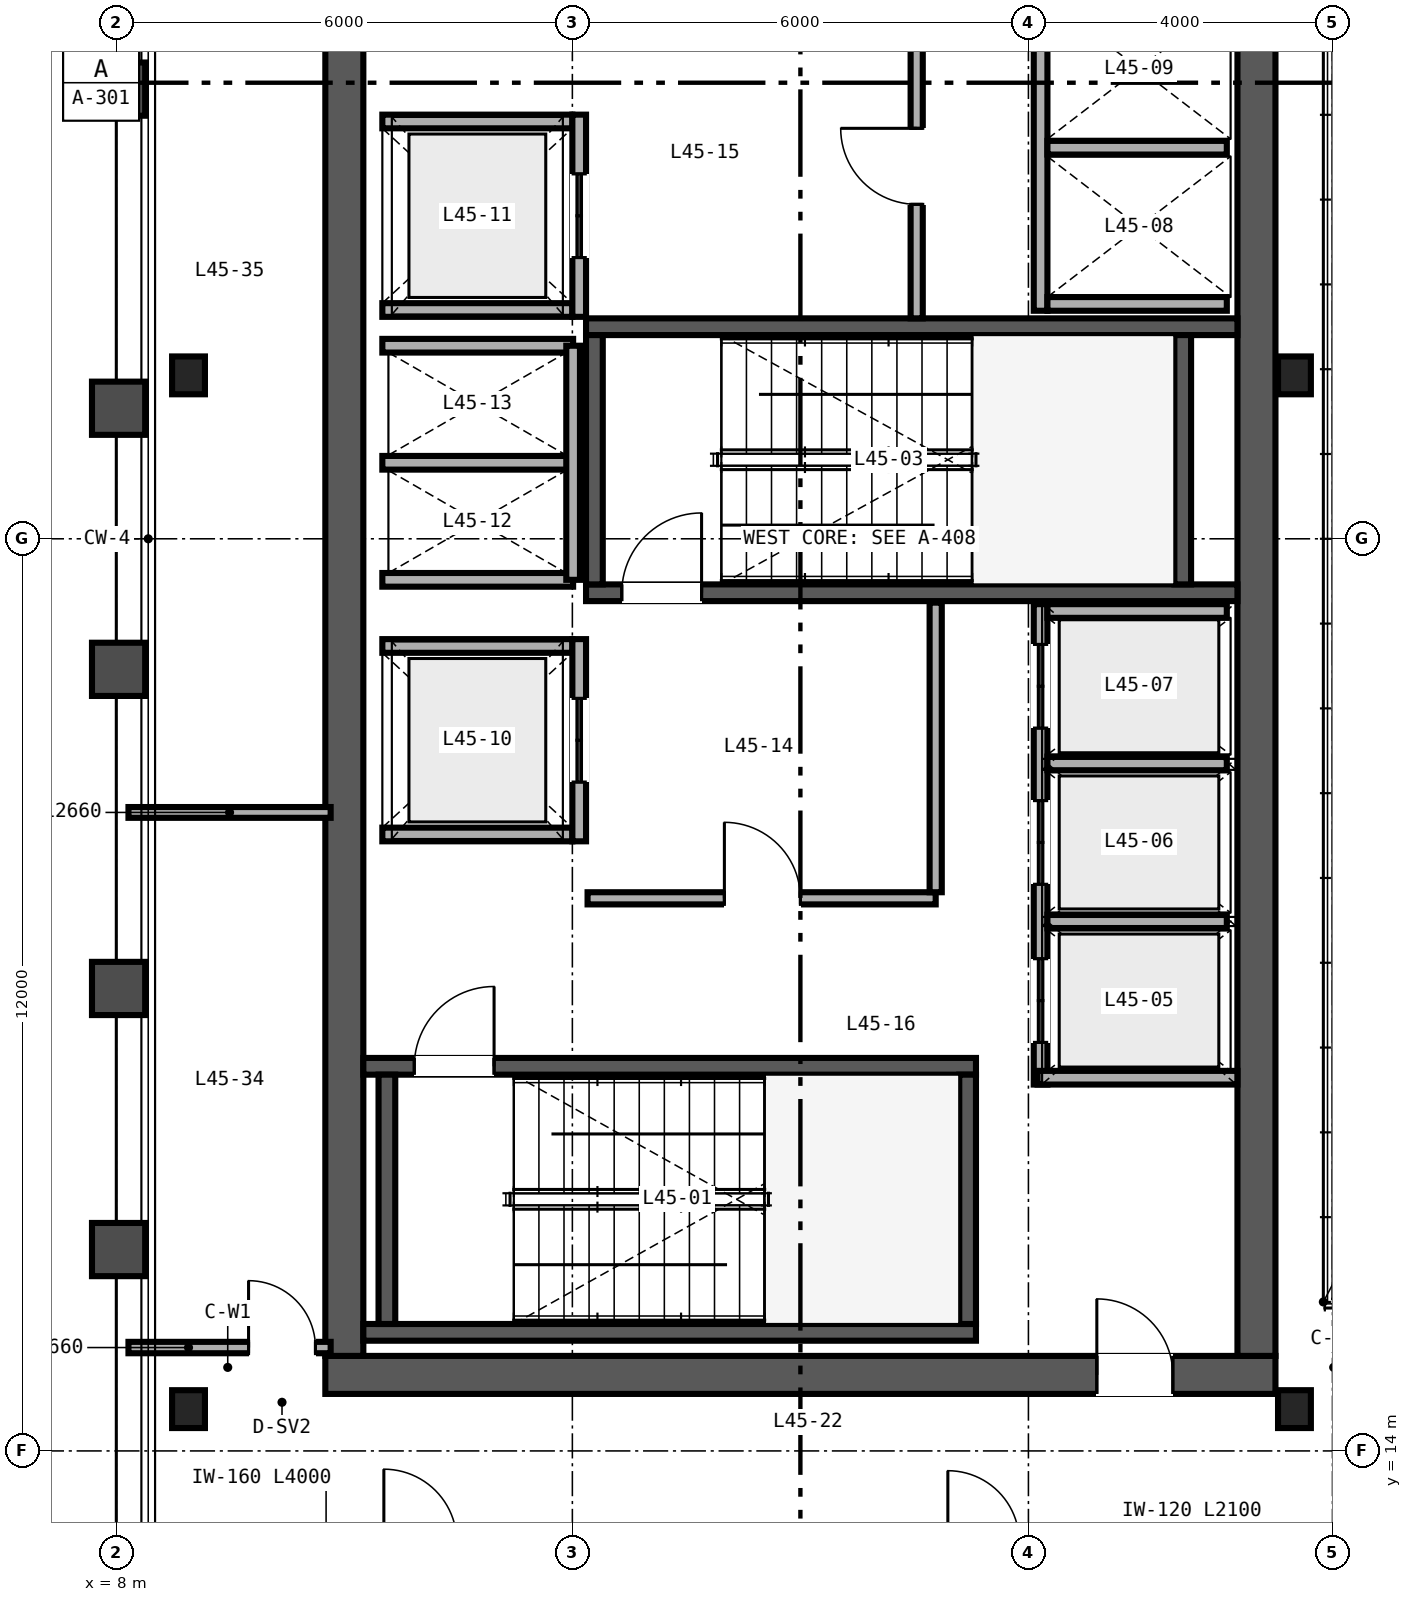
"""IFC4 building model, lengths in metres.
Left out: names, types, materials, properties, quantities, classifications, styles, units other than length and angle.
Written with IfcOpenShell. Run it as: python <this file> out.ifc"""

import sys

from ifc_helpers import new_model, si_unit, direction, frame, frame_2d, origin, origin_2d, place, context, subcontext, project, spatial, rectangle, i_section, extrude, source, transform, mapped, element, fill, save


model = new_model("IFC4")
c1 = context("Model", 3, precision=1e-05, world=origin(), true_north=direction((0.0, 1.0)))
c2 = subcontext(c1, "Body", "Model", "MODEL_VIEW")
j1 = project(units=[si_unit("LENGTHUNIT", "METRE"), si_unit("PLANEANGLEUNIT", "RADIAN")], contexts=[c1])
p1 = place(None, origin())
s1 = spatial("IfcSite", under=j1, at=p1, CompositionType="ELEMENT")
p2 = place(p1, origin())
s2 = spatial("IfcBuilding", under=s1, at=p2, CompositionType="ELEMENT")
p3 = place(p2, frame((0.0, 0.0, 181.2)))
s3 = spatial("IfcBuildingStorey", under=s2, at=p3, CompositionType="ELEMENT", Elevation=181.2)
p4 = place(p3, frame((10.75, 15.0, 0.0), z_axis=(0.0, 0.0, 1.0), x_axis=(1.0, 0.0, 0.0)))
e1 = element("IfcWall", 1, at=p4, inside=s3, PredefinedType="SHEAR", context=c2, shape_type="SweptSolid", body=[
    extrude(rectangle(XDim=12.5, YDim=0.5, at=frame_2d((6.25, 0.0))), origin(), (0.0, 0.0, 1.0), 3.37),
])
p5 = place(p4, frame((10.15, 0.0, 0.0)))
e2 = element("IfcOpeningElement", 2, at=p5, cuts=e1, PredefinedType="OPENING", context=c2, shape_type="SweptSolid", body=[
    extrude(rectangle(XDim=1.0, YDim=2.15, at=frame_2d((0.5, 1.075))), frame((0.0, 0.26, 0.0), z_axis=(0.0, -1.0, 0.0), x_axis=(1.0, 0.0, 0.0)), (0.0, 0.0, 1.0), 0.52),
])
for number, where, z_axis, x_axis in (
    (3, (11.0, 15.25, 0.0), (0.0, 0.0, 1.0), (0.0, 1.0, 0.0)),
    (4, (23.0, 15.25, 0.0), (0.0, 0.0, 1.0), (0.0, 1.0, 0.0)),
):
    element("IfcWall", number, at=place(p3, frame(where, z_axis=z_axis, x_axis=x_axis)), inside=s3, PredefinedType="SHEAR", context=c2, shape_type="SweptSolid", body=[
        extrude(rectangle(XDim=21.5, YDim=0.5, at=frame_2d((10.75, 0.0))), origin(), (0.0, 0.0, 1.0), 3.37),
    ])
p6 = place(p3, frame((11.25, 15.56, 0.0), z_axis=(0.0, 0.0, 1.0), x_axis=(1.0, 0.0, 0.0)))
e5 = element("IfcWall", 5, at=p6, inside=s3, PredefinedType="SHEAR", context=c2, shape_type="SweptSolid", body=[
    extrude(rectangle(XDim=8.06, YDim=0.22, at=frame_2d((4.03, 0.0))), origin(), (0.0, 0.0, 1.0), 3.4),
])
p7 = place(p3, frame((11.25, 19.06, 0.0), z_axis=(0.0, 0.0, 1.0), x_axis=(1.0, 0.0, 0.0)))
e6 = element("IfcWall", 6, at=p7, inside=s3, PredefinedType="SHEAR", context=c2, shape_type="SweptSolid", body=[
    extrude(rectangle(XDim=8.06, YDim=0.22, at=frame_2d((4.03, 0.0))), origin(), (0.0, 0.0, 1.0), 3.4),
])
p8 = place(p7, frame((0.67, 0.0, 0.0)))
e7 = element("IfcOpeningElement", 7, at=p8, cuts=e6, PredefinedType="OPENING", context=c2, shape_type="SweptSolid", body=[
    extrude(rectangle(XDim=1.05, YDim=2.15, at=frame_2d((0.525, 1.075))), frame((0.0, 0.12, 0.0), z_axis=(0.0, -1.0, 0.0), x_axis=(1.0, 0.0, 0.0)), (0.0, 0.0, 1.0), 0.24),
])
for number, where, z_axis, x_axis in (
    (8, (11.56, 15.67, 0.0), (0.0, 0.0, 1.0), (0.0, 1.0, 0.0)),
    (9, (19.2, 15.67, 0.0), (0.0, 0.0, 1.0), (0.0, 1.0, 0.0)),
):
    element("IfcWall", number, at=place(p3, frame(where, z_axis=z_axis, x_axis=x_axis)), inside=s3, PredefinedType="SHEAR", context=c2, shape_type="SweptSolid", body=[
        extrude(rectangle(XDim=3.28, YDim=0.22, at=frame_2d((1.64, 0.0))), origin(), (0.0, 0.0, 1.0), 3.4),
    ])
p9 = place(p3, frame((14.18, 25.29, 0.0), z_axis=(0.0, 0.0, 1.0), x_axis=(1.0, 0.0, 0.0)))
e10 = element("IfcWall", 10, at=p9, inside=s3, PredefinedType="SHEAR", context=c2, shape_type="SweptSolid", body=[
    extrude(rectangle(XDim=8.57, YDim=0.22, at=frame_2d((4.285, 0.0))), origin(), (0.0, 0.0, 1.0), 3.4),
])
p10 = place(p9, frame((0.47, 0.0, 0.0)))
e11 = element("IfcOpeningElement", 11, at=p10, cuts=e10, PredefinedType="OPENING", context=c2, shape_type="SweptSolid", body=[
    extrude(rectangle(XDim=1.05, YDim=2.15, at=frame_2d((0.525, 1.075))), frame((0.0, 0.12, 0.0), z_axis=(0.0, -1.0, 0.0), x_axis=(1.0, 0.0, 0.0)), (0.0, 0.0, 1.0), 0.24),
])
p11 = place(p3, frame((14.18, 28.79, 0.0), z_axis=(0.0, 0.0, 1.0), x_axis=(1.0, 0.0, 0.0)))
e12 = element("IfcWall", 12, at=p11, inside=s3, PredefinedType="SHEAR", context=c2, shape_type="SweptSolid", body=[
    extrude(rectangle(XDim=8.57, YDim=0.22, at=frame_2d((4.285, 0.0))), origin(), (0.0, 0.0, 1.0), 3.4),
])
for number, where, z_axis, x_axis in (
    (13, (14.29, 25.4, 0.0), (0.0, 0.0, 1.0), (0.0, 1.0, 0.0)),
    (14, (22.03, 25.4, 0.0), (0.0, 0.0, 1.0), (0.0, 1.0, 0.0)),
):
    element("IfcWall", number, at=place(p3, frame(where, z_axis=z_axis, x_axis=x_axis)), inside=s3, PredefinedType="SHEAR", context=c2, shape_type="SweptSolid", body=[
        extrude(rectangle(XDim=3.28, YDim=0.22, at=frame_2d((1.64, 0.0))), origin(), (0.0, 0.0, 1.0), 3.4),
    ])
m1 = source(origin(), c2, "Body", "SweptSolid", [
    extrude(i_section(OverallWidth=0.432, OverallDepth=0.498, WebThickness=0.056, FlangeThickness=0.089, FilletRadius=0.025, at=origin_2d()), origin(), (0.0, 0.0, 1.0), 3.37),
])
for number, where, z_axis, x_axis in (
    (15, (8.95, 14.55, 0.0), (0.0, 0.0, 1.0), (1.0, 0.0, 0.0)),
    (16, (23.5, 14.55, 0.0), (0.0, 0.0, 1.0), (1.0, 0.0, 0.0)),
    (17, (8.95, 28.15, 0.0), (0.0, 0.0, 1.0), (1.0, 0.0, 0.0)),
    (18, (23.5, 28.15, 0.0), (0.0, 0.0, 1.0), (1.0, 0.0, 0.0)),
):
    element("IfcColumn", number, at=place(p3, frame(where, z_axis=z_axis, x_axis=x_axis)), inside=s3, PredefinedType="COLUMN", context=c2, shape_type="MappedRepresentation", body=[
        mapped(m1, transform((0.0, 0.0, 0.0), scale=1.0)),
    ])
p12 = place(p3, frame((20.16, 18.82, 0.0), z_axis=(0.0, 0.0, 1.0), x_axis=(0.0, 1.0, 0.0)))
e19 = element("IfcWall", 19, at=p12, inside=s3, PredefinedType="SOLIDWALL", context=c2, shape_type="SweptSolid", body=[
    extrude(rectangle(XDim=6.32, YDim=0.18, at=frame_2d((3.16, 0.0))), origin(), (0.0, 0.0, 1.0), 2.47),
])
p13 = place(p12, frame((0.555, 0.0, 0.0)))
e20 = element("IfcOpeningElement", 20, at=p13, cuts=e19, PredefinedType="OPENING", context=c2, shape_type="SweptSolid", body=[
    extrude(rectangle(XDim=1.1, YDim=2.2, at=frame_2d((0.55, 1.1))), frame((0.0, 0.1, 0.0), z_axis=(0.0, -1.0, 0.0), x_axis=(1.0, 0.0, 0.0)), (0.0, 0.0, 1.0), 0.2),
])
p14 = place(p12, frame((2.635, 0.0, 0.0)))
e21 = element("IfcOpeningElement", 21, at=p14, cuts=e19, PredefinedType="OPENING", context=c2, shape_type="SweptSolid", body=[
    extrude(rectangle(XDim=1.1, YDim=2.2, at=frame_2d((0.55, 1.1))), frame((0.0, 0.1, 0.0), z_axis=(0.0, -1.0, 0.0), x_axis=(1.0, 0.0, 0.0)), (0.0, 0.0, 1.0), 0.2),
])
p15 = place(p12, frame((4.69, 0.0, 0.0)))
e22 = element("IfcOpeningElement", 22, at=p15, cuts=e19, PredefinedType="OPENING", context=c2, shape_type="SweptSolid", body=[
    extrude(rectangle(XDim=1.1, YDim=2.2, at=frame_2d((0.55, 1.1))), frame((0.0, 0.1, 0.0), z_axis=(0.0, -1.0, 0.0), x_axis=(1.0, 0.0, 0.0)), (0.0, 0.0, 1.0), 0.2),
])
p16 = place(p3, frame((20.12, 18.91, 0.0), z_axis=(0.0, 0.0, 1.0), x_axis=(1.0, 0.0, 0.0)))
e23 = element("IfcWall", 23, at=p16, inside=s3, PredefinedType="SOLIDWALL", context=c2, shape_type="SweptSolid", body=[
    extrude(rectangle(XDim=2.63, YDim=0.18, at=frame_2d((1.315, 0.0))), origin(), (0.0, 0.0, 1.0), 3.37),
])
p17 = place(p3, frame((20.25, 25.05, 0.0), z_axis=(0.0, 0.0, 1.0), x_axis=(1.0, 0.0, 0.0)))
e24 = element("IfcWall", 24, at=p17, inside=s3, PredefinedType="SOLIDWALL", context=c2, shape_type="SweptSolid", body=[
    extrude(rectangle(XDim=2.36, YDim=0.18, at=frame_2d((1.18, 0.0))), origin(), (0.0, 0.0, 1.0), 3.37),
])
p18 = place(p3, frame((20.25, 20.965, 0.0), z_axis=(0.0, 0.0, 1.0), x_axis=(1.0, 0.0, 0.0)))
e25 = element("IfcWall", 25, at=p18, inside=s3, PredefinedType="SOLIDWALL", context=c2, shape_type="SweptSolid", body=[
    extrude(rectangle(XDim=2.36, YDim=0.18, at=frame_2d((1.18, 0.0))), origin(), (0.0, 0.0, 1.0), 2.47),
])
p19 = place(p3, frame((20.25, 23.045, 0.0), z_axis=(0.0, 0.0, 1.0), x_axis=(1.0, 0.0, 0.0)))
e26 = element("IfcWall", 26, at=p19, inside=s3, PredefinedType="SOLIDWALL", context=c2, shape_type="SweptSolid", body=[
    extrude(rectangle(XDim=2.36, YDim=0.18, at=frame_2d((1.18, 0.0))), origin(), (0.0, 0.0, 1.0), 3.37),
])
p20 = place(p3, frame((20.16, 29.0, 0.0), z_axis=(0.0, 0.0, 1.0), x_axis=(0.0, 1.0, 0.0)))
e27 = element("IfcWall", 27, at=p20, inside=s3, PredefinedType="SOLIDWALL", context=c2, shape_type="SweptSolid", body=[
    extrude(rectangle(XDim=4.29, YDim=0.18, at=frame_2d((2.145, 0.0))), origin(), (0.0, 0.0, 1.0), 3.37),
])
for number, where, z_axis, x_axis in (
    (28, (20.25, 29.09, 0.0), (0.0, 0.0, 1.0), (1.0, 0.0, 0.0)),
    (29, (20.25, 31.145, 0.0), (0.0, 0.0, 1.0), (1.0, 0.0, 0.0)),
):
    element("IfcWall", number, at=place(p3, frame(where, z_axis=z_axis, x_axis=x_axis)), inside=s3, PredefinedType="SOLIDWALL", context=c2, shape_type="SweptSolid", body=[
        extrude(rectangle(XDim=2.36, YDim=0.18, at=frame_2d((1.18, 0.0))), origin(), (0.0, 0.0, 1.0), 3.37),
    ])
for number, where, z_axis, x_axis in (
    (30, (11.5, 22.11, 0.0), (0.0, 0.0, 1.0), (1.0, 0.0, 0.0)),
    (31, (11.5, 24.59, 0.0), (0.0, 0.0, 1.0), (1.0, 0.0, 0.0)),
):
    element("IfcWall", number, at=place(p3, frame(where, z_axis=z_axis, x_axis=x_axis)), inside=s3, PredefinedType="SOLIDWALL", context=c2, shape_type="SweptSolid", body=[
        extrude(rectangle(XDim=2.5, YDim=0.18, at=frame_2d((1.25, 0.0))), origin(), (0.0, 0.0, 1.0), 3.37),
    ])
p21 = place(p3, frame((14.09, 22.02, 0.0), z_axis=(0.0, 0.0, 1.0), x_axis=(0.0, 1.0, 0.0)))
e32 = element("IfcWall", 32, at=p21, inside=s3, PredefinedType="SOLIDWALL", context=c2, shape_type="SweptSolid", body=[
    extrude(rectangle(XDim=2.66, YDim=0.18, at=frame_2d((1.33, 0.0))), origin(), (0.0, 0.0, 1.0), 3.37),
])
p22 = place(p21, frame((0.78, 0.0, 0.0)))
e33 = element("IfcOpeningElement", 33, at=p22, cuts=e32, PredefinedType="OPENING", context=c2, shape_type="SweptSolid", body=[
    extrude(rectangle(XDim=1.1, YDim=2.2, at=frame_2d((0.55, 1.1))), frame((0.0, 0.1, 0.0), z_axis=(0.0, -1.0, 0.0), x_axis=(1.0, 0.0, 0.0)), (0.0, 0.0, 1.0), 0.2),
])
for number, where, z_axis, x_axis in (
    (34, (11.5, 29.01, 0.0), (0.0, 0.0, 1.0), (1.0, 0.0, 0.0)),
    (35, (11.5, 31.49, 0.0), (0.0, 0.0, 1.0), (1.0, 0.0, 0.0)),
):
    element("IfcWall", number, at=place(p3, frame(where, z_axis=z_axis, x_axis=x_axis)), inside=s3, PredefinedType="SOLIDWALL", context=c2, shape_type="SweptSolid", body=[
        extrude(rectangle(XDim=2.5, YDim=0.18, at=frame_2d((1.25, 0.0))), origin(), (0.0, 0.0, 1.0), 3.37),
    ])
p23 = place(p3, frame((14.09, 28.92, 0.0), z_axis=(0.0, 0.0, 1.0), x_axis=(0.0, 1.0, 0.0)))
e36 = element("IfcWall", 36, at=p23, inside=s3, PredefinedType="SOLIDWALL", context=c2, shape_type="SweptSolid", body=[
    extrude(rectangle(XDim=2.66, YDim=0.18, at=frame_2d((1.33, 0.0))), origin(), (0.0, 0.0, 1.0), 3.37),
])
p24 = place(p23, frame((0.78, 0.0, 0.0)))
e37 = element("IfcOpeningElement", 37, at=p24, cuts=e36, PredefinedType="OPENING", context=c2, shape_type="SweptSolid", body=[
    extrude(rectangle(XDim=1.1, YDim=2.2, at=frame_2d((0.55, 1.1))), frame((0.0, 0.1, 0.0), z_axis=(0.0, -1.0, 0.0), x_axis=(1.0, 0.0, 0.0)), (0.0, 0.0, 1.0), 0.2),
])
for number, where, z_axis, x_axis in (
    (38, (11.5, 25.46, 0.0), (0.0, 0.0, 1.0), (1.0, 0.0, 0.0)),
    (39, (11.5, 27.0, 0.0), (0.0, 0.0, 1.0), (1.0, 0.0, 0.0)),
    (40, (11.5, 28.54, 0.0), (0.0, 0.0, 1.0), (1.0, 0.0, 0.0)),
):
    element("IfcWall", number, at=place(p3, frame(where, z_axis=z_axis, x_axis=x_axis)), inside=s3, PredefinedType="SOLIDWALL", context=c2, shape_type="SweptSolid", body=[
        extrude(rectangle(XDim=2.51, YDim=0.18, at=frame_2d((1.255, 0.0))), origin(), (0.0, 0.0, 1.0), 3.37),
    ])
p25 = place(p3, frame((14.01, 25.46, 0.0), z_axis=(0.0, 0.0, 1.0), x_axis=(0.0, 1.0, 0.0)))
e41 = element("IfcWall", 41, at=p25, inside=s3, PredefinedType="SOLIDWALL", context=c2, shape_type="SweptSolid", body=[
    extrude(rectangle(XDim=3.08, YDim=0.18, at=frame_2d((1.54, 0.0))), origin(), (0.0, 0.0, 1.0), 3.37),
])
p26 = place(p3, frame((14.2, 21.27, 0.0), z_axis=(0.0, 0.0, 1.0), x_axis=(1.0, 0.0, 0.0)))
e42 = element("IfcWall", 42, at=p26, inside=s3, PredefinedType="PARTITIONING", context=c2, shape_type="SweptSolid", body=[
    extrude(rectangle(XDim=4.58, YDim=0.16, at=frame_2d((2.29, 0.0))), origin(), (0.0, 0.0, 1.0), 3.37),
])
p27 = place(p26, frame((1.8, 0.0, 0.0)))
e43 = element("IfcOpeningElement", 43, at=p27, cuts=e42, PredefinedType="OPENING", context=c2, shape_type="SweptSolid", body=[
    extrude(rectangle(XDim=1.0, YDim=2.15, at=frame_2d((0.5, 1.075))), frame((0.0, 0.09, 0.0), z_axis=(0.0, -1.0, 0.0), x_axis=(1.0, 0.0, 0.0)), (0.0, 0.0, 1.0), 0.18),
])
p28 = place(p3, frame((18.78, 21.35, 0.0), z_axis=(0.0, 0.0, 1.0), x_axis=(0.0, 1.0, 0.0)))
e44 = element("IfcWall", 44, at=p28, inside=s3, PredefinedType="PARTITIONING", context=c2, shape_type="SweptSolid", body=[
    extrude(rectangle(XDim=3.81, YDim=0.16, at=frame_2d((1.905, 0.0))), origin(), (0.0, 0.0, 1.0), 3.37),
])
p29 = place(p3, frame((18.53, 28.9, 0.0), z_axis=(0.0, 0.0, 1.0), x_axis=(0.0, 1.0, 0.0)))
e45 = element("IfcWall", 45, at=p29, inside=s3, PredefinedType="PARTITIONING", context=c2, shape_type="SweptSolid", body=[
    extrude(rectangle(XDim=3.9, YDim=0.16, at=frame_2d((1.95, 0.0))), origin(), (0.0, 0.0, 1.0), 3.37),
])
p30 = place(p29, frame((1.5, 0.0, 0.0)))
e46 = element("IfcOpeningElement", 46, at=p30, cuts=e45, PredefinedType="OPENING", context=c2, shape_type="SweptSolid", body=[
    extrude(rectangle(XDim=1.0, YDim=2.15, at=frame_2d((0.5, 1.075))), frame((0.0, 0.09, 0.0), z_axis=(0.0, -1.0, 0.0), x_axis=(1.0, 0.0, 0.0)), (0.0, 0.0, 1.0), 0.18),
])
p31 = place(p3, frame((8.16, 15.36, 0.0), z_axis=(0.0, 0.0, 1.0), x_axis=(1.0, 0.0, 0.0)))
e47 = element("IfcWall", 47, at=p31, inside=s3, PredefinedType="PARTITIONING", context=c2, shape_type="SweptSolid", body=[
    extrude(rectangle(XDim=2.66, YDim=0.15, at=frame_2d((1.33, 0.0))), origin(), (0.0, 0.0, 1.0), 2.591),
])
p32 = place(p31, frame((1.58, 0.0, 0.0)))
e48 = element("IfcOpeningElement", 48, at=p32, cuts=e47, PredefinedType="OPENING", context=c2, shape_type="SweptSolid", body=[
    extrude(rectangle(XDim=0.88, YDim=2.15, at=frame_2d((0.44, 1.075))), frame((0.0, 0.085, 0.0), z_axis=(0.0, -1.0, 0.0), x_axis=(1.0, 0.0, 0.0)), (0.0, 0.0, 1.0), 0.17),
])
p33 = place(p3, frame((8.16, 22.4, 0.0), z_axis=(0.0, 0.0, 1.0), x_axis=(1.0, 0.0, 0.0)))
e49 = element("IfcWall", 49, at=p33, inside=s3, PredefinedType="PARTITIONING", context=c2, shape_type="SweptSolid", body=[
    extrude(rectangle(XDim=2.66, YDim=0.142, at=frame_2d((1.33, 0.0))), origin(), (0.0, 0.0, 1.0), 2.591),
])
m2 = source(origin(), c2, "Body", "SweptSolid", [
    extrude(rectangle(XDim=1.05, YDim=2.15, at=frame_2d((0.525, 1.075))), frame((0.0, 0.025, 0.0), z_axis=(0.0, -1.0, 0.0), x_axis=(1.0, 0.0, 0.0)), (0.0, 0.0, 1.0), 0.05),
])
p34 = place(p8, origin())
e50 = element("IfcDoor", 50, at=p34, inside=s3, OperationType="SINGLE_SWING_RIGHT", PredefinedType="DOOR", context=c2, shape_type="MappedRepresentation", body=[
    mapped(m2, transform((0.0, 0.0, 0.0), scale=1.0)),
])
fill(e7, e50)
p35 = place(p10, origin())
e51 = element("IfcDoor", 51, at=p35, inside=s3, OperationType="SINGLE_SWING_RIGHT", PredefinedType="DOOR", context=c2, shape_type="MappedRepresentation", body=[
    mapped(m2, transform((0.0, 0.0, 0.0), scale=1.0)),
])
fill(e11, e51)
m3 = source(origin(), c2, "Body", "SweptSolid", [
    extrude(rectangle(XDim=1.1, YDim=2.2, at=frame_2d((0.55, 1.1))), frame((0.0, 0.025, 0.0), z_axis=(0.0, -1.0, 0.0), x_axis=(1.0, 0.0, 0.0)), (0.0, 0.0, 1.0), 0.05),
])
p36 = place(p13, origin())
e52 = element("IfcDoor", 52, at=p36, inside=s3, OperationType="DOUBLE_DOOR_SLIDING", PredefinedType="DOOR", context=c2, shape_type="MappedRepresentation", body=[
    mapped(m3, transform((0.0, 0.0, 0.0), scale=1.0)),
])
fill(e20, e52)
p37 = place(p14, origin())
e53 = element("IfcDoor", 53, at=p37, inside=s3, OperationType="DOUBLE_DOOR_SLIDING", PredefinedType="DOOR", context=c2, shape_type="MappedRepresentation", body=[
    mapped(m3, transform((0.0, 0.0, 0.0), scale=1.0)),
])
fill(e21, e53)
p38 = place(p15, origin())
e54 = element("IfcDoor", 54, at=p38, inside=s3, OperationType="DOUBLE_DOOR_SLIDING", PredefinedType="DOOR", context=c2, shape_type="MappedRepresentation", body=[
    mapped(m3, transform((0.0, 0.0, 0.0), scale=1.0)),
])
fill(e22, e54)
p39 = place(p22, origin())
e55 = element("IfcDoor", 55, at=p39, inside=s3, OperationType="DOUBLE_DOOR_SLIDING", PredefinedType="DOOR", context=c2, shape_type="MappedRepresentation", body=[
    mapped(m3, transform((0.0, 0.0, 0.0), scale=1.0)),
])
fill(e33, e55)
p40 = place(p24, origin())
e56 = element("IfcDoor", 56, at=p40, inside=s3, OperationType="DOUBLE_DOOR_SLIDING", PredefinedType="DOOR", context=c2, shape_type="MappedRepresentation", body=[
    mapped(m3, transform((0.0, 0.0, 0.0), scale=1.0)),
])
fill(e37, e56)
m4 = source(origin(), c2, "Body", "SweptSolid", [
    extrude(rectangle(XDim=1.0, YDim=2.15, at=frame_2d((0.5, 1.075))), frame((0.0, 0.025, 0.0), z_axis=(0.0, -1.0, 0.0), x_axis=(1.0, 0.0, 0.0)), (0.0, 0.0, 1.0), 0.05),
])
p41 = place(p27, origin())
e57 = element("IfcDoor", 57, at=p41, inside=s3, OperationType="SINGLE_SWING_LEFT", PredefinedType="DOOR", context=c2, shape_type="MappedRepresentation", body=[
    mapped(m4, transform((0.0, 0.0, 0.0), scale=1.0)),
])
fill(e43, e57)
p42 = place(p30, origin())
e58 = element("IfcDoor", 58, at=p42, inside=s3, OperationType="SINGLE_SWING_RIGHT", PredefinedType="DOOR", context=c2, shape_type="MappedRepresentation", body=[
    mapped(m4, transform((0.0, 0.0, 0.0), scale=1.0)),
])
fill(e46, e58)
p43 = place(p5, origin())
e59 = element("IfcDoor", 59, at=p43, inside=s3, OperationType="SINGLE_SWING_LEFT", PredefinedType="DOOR", context=c2, shape_type="MappedRepresentation", body=[
    mapped(m4, transform((0.0, 0.0, 0.0), scale=1.0)),
])
fill(e2, e59)
m5 = source(origin(), c2, "Body", "SweptSolid", [
    extrude(rectangle(XDim=0.88, YDim=2.15, at=frame_2d((0.44, 1.075))), frame((0.0, 0.025, 0.0), z_axis=(0.0, -1.0, 0.0), x_axis=(1.0, 0.0, 0.0)), (0.0, 0.0, 1.0), 0.05),
])
p44 = place(p32, origin())
e60 = element("IfcDoor", 60, at=p44, inside=s3, OperationType="SINGLE_SWING_LEFT", PredefinedType="DOOR", context=c2, shape_type="MappedRepresentation", body=[
    mapped(m5, transform((0.0, 0.0, 0.0), scale=1.0)),
])
fill(e48, e60)
save(model, sys.argv[1])
